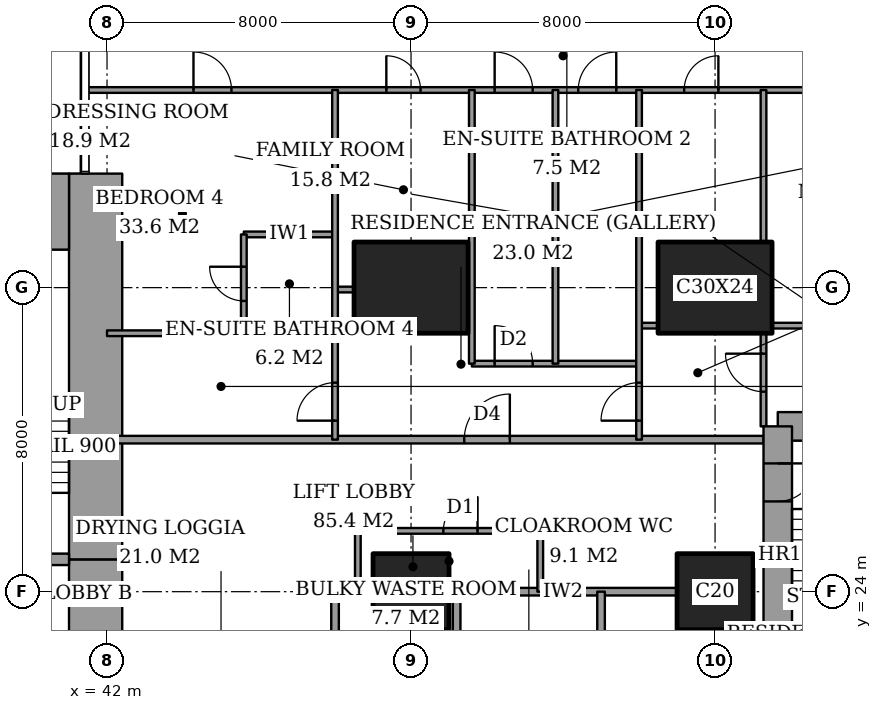
"""IFC4 building model, lengths in metres.
Left out: names, types, materials, properties, quantities, classifications, styles, units other than length and angle.
Written with IfcOpenShell. Run it as: python <this file> out.ifc"""

import sys

from ifc_helpers import new_model, si_unit, direction, frame, frame_2d, origin, origin_2d, place, context, subcontext, project, spatial, rectangle, extrude, element, fill, save


model = new_model("IFC4")
c1 = context("Model", 3, precision=1e-05, world=origin(), true_north=direction((0.0, 1.0)))
c2 = subcontext(c1, "Body", "Model", "MODEL_VIEW")
j1 = project(units=[si_unit("LENGTHUNIT", "METRE"), si_unit("PLANEANGLEUNIT", "RADIAN")], contexts=[c1])
p1 = place(None, origin())
s1 = spatial("IfcSite", under=j1, at=p1, CompositionType="ELEMENT")
p2 = place(p1, origin())
s2 = spatial("IfcBuilding", under=s1, at=p2, CompositionType="ELEMENT")
p3 = place(p2, frame((0.0, 0.0, 150.2)))
s3 = spatial("IfcBuildingStorey", under=s2, at=p3, CompositionType="ELEMENT", Elevation=150.2)
p4 = place(p3, frame((50.0, 24.0, 0.0), z_axis=(0.0, 0.0, 1.0), x_axis=(1.0, 0.0, 0.0)))
e1 = element("IfcColumn", 1, at=p4, inside=s3, PredefinedType="COLUMN", context=c2, shape_type="SweptSolid", body=[
    extrude(rectangle(XDim=2.0, YDim=2.0, at=origin_2d()), origin(), (0.0, 0.0, 1.0), 3.6),
])
p5 = place(p3, frame((50.0, 32.0, 0.0), z_axis=(0.0, 0.0, 1.0), x_axis=(1.0, 0.0, 0.0)))
e2 = element("IfcColumn", 2, at=p5, inside=s3, PredefinedType="COLUMN", context=c2, shape_type="SweptSolid", body=[
    extrude(rectangle(XDim=3.0, YDim=2.4, at=origin_2d()), origin(), (0.0, 0.0, 1.0), 3.6),
])
p6 = place(p3, frame((58.0, 24.0, 0.0), z_axis=(0.0, 0.0, 1.0), x_axis=(1.0, 0.0, 0.0)))
e3 = element("IfcColumn", 3, at=p6, inside=s3, PredefinedType="COLUMN", context=c2, shape_type="SweptSolid", body=[
    extrude(rectangle(XDim=2.0, YDim=2.0, at=origin_2d()), origin(), (0.0, 0.0, 1.0), 3.6),
])
p7 = place(p3, frame((58.0, 32.0, 0.0), z_axis=(0.0, 0.0, 1.0), x_axis=(1.0, 0.0, 0.0)))
e4 = element("IfcColumn", 4, at=p7, inside=s3, PredefinedType="COLUMN", context=c2, shape_type="SweptSolid", body=[
    extrude(rectangle(XDim=3.0, YDim=2.4, at=origin_2d()), origin(), (0.0, 0.0, 1.0), 3.6),
])
p8 = place(p3, frame((37.85, 34.0, 0.0), z_axis=(0.0, 0.0, 1.0), x_axis=(1.0, 0.0, 0.0)))
e5 = element("IfcWall", 5, at=p8, inside=s3, PredefinedType="SHEAR", context=c2, shape_type="SweptSolid", body=[
    extrude(rectangle(XDim=3.15, YDim=2.0, at=frame_2d((1.575, 0.0))), origin(), (0.0, 0.0, 1.0), 3.6),
])
p9 = place(p3, frame((41.7, 13.0, 0.0), z_axis=(0.0, 0.0, 1.0), x_axis=(0.0, 1.0, 0.0)))
e6 = element("IfcWall", 6, at=p9, inside=s3, PredefinedType="SHEAR", context=c2, shape_type="SweptSolid", body=[
    extrude(rectangle(XDim=11.85, YDim=1.4, at=frame_2d((5.925, 0.0))), origin(), (0.0, 0.0, 1.0), 3.6),
])
p10 = place(p9, frame((7.5, 0.0, 0.0)))
e7 = element("IfcOpeningElement", 7, at=p10, cuts=e6, PredefinedType="OPENING", context=c2, shape_type="SweptSolid", body=[
    extrude(rectangle(XDim=1.8, YDim=2.4, at=frame_2d((0.9, 1.2))), frame((0.0, 0.71, 0.0), z_axis=(0.0, -1.0, 0.0), x_axis=(1.0, 0.0, 0.0)), (0.0, 0.0, 1.0), 1.42),
])
p11 = place(p3, frame((41.7, 24.85, 0.0), z_axis=(0.0, 0.0, 1.0), x_axis=(0.0, 1.0, 0.0)))
e8 = element("IfcWall", 8, at=p11, inside=s3, PredefinedType="SHEAR", context=c2, shape_type="SweptSolid", body=[
    extrude(rectangle(XDim=10.15, YDim=1.4, at=frame_2d((5.075, 0.0))), origin(), (0.0, 0.0, 1.0), 3.6),
])
p12 = place(p3, frame((37.85, 24.85, 0.0), z_axis=(0.0, 0.0, 1.0), x_axis=(1.0, 0.0, 0.0)))
e9 = element("IfcWall", 9, at=p12, inside=s3, PredefinedType="SHEAR", context=c2, shape_type="SweptSolid", body=[
    extrude(rectangle(XDim=3.15, YDim=0.3, at=frame_2d((1.575, 0.0))), origin(), (0.0, 0.0, 1.0), 3.6),
])
p13 = place(p12, frame((0.95, 0.0, 0.0)))
e10 = element("IfcOpeningElement", 10, at=p13, cuts=e9, PredefinedType="OPENING", context=c2, shape_type="SweptSolid", body=[
    extrude(rectangle(XDim=1.0, YDim=2.1, at=frame_2d((0.5, 1.05))), frame((0.0, 0.16, 0.0), z_axis=(0.0, -1.0, 0.0), x_axis=(1.0, 0.0, 0.0)), (0.0, 0.0, 1.0), 0.32),
])
p14 = place(p3, frame((64.1, 28.35, 0.0), z_axis=(0.0, 0.0, 1.0), x_axis=(-1.0, 0.0, 0.0)))
e11 = element("IfcWall", 11, at=p14, inside=s3, PredefinedType="SHEAR", context=c2, shape_type="SweptSolid", body=[
    extrude(rectangle(XDim=4.45, YDim=0.75, at=frame_2d((2.225, 0.0))), origin(), (0.0, 0.0, 1.0), 3.6),
])
p15 = place(p3, frame((59.65, 28.35, 0.0), z_axis=(0.0, 0.0, 1.0), x_axis=(0.0, -1.0, 0.0)))
e12 = element("IfcWall", 12, at=p15, inside=s3, PredefinedType="SHEAR", context=c2, shape_type="SweptSolid", body=[
    extrude(rectangle(XDim=8.7, YDim=0.75, at=frame_2d((4.35, 0.0))), origin(), (0.0, 0.0, 1.0), 3.6),
])
p16 = place(p15, frame((0.975, 0.0, 0.0)))
e13 = element("IfcOpeningElement", 13, at=p16, cuts=e12, PredefinedType="OPENING", context=c2, shape_type="SweptSolid", body=[
    extrude(rectangle(XDim=1.0, YDim=2.1, at=frame_2d((0.5, 1.05))), frame((0.0, 0.385, 0.0), z_axis=(0.0, -1.0, 0.0), x_axis=(1.0, 0.0, 0.0)), (0.0, 0.0, 1.0), 0.77),
])
p17 = place(p3, frame((48.0, 24.0, 0.0), z_axis=(0.0, 0.0, 1.0), x_axis=(1.0, 0.0, 0.0)))
e14 = element("IfcWall", 14, at=p17, inside=s3, PredefinedType="PARTITIONING", context=c2, shape_type="SweptSolid", body=[
    extrude(rectangle(XDim=1.0, YDim=0.2, at=frame_2d((0.5, 0.0))), origin(), (0.0, 0.0, 1.0), 3.35),
])
p18 = place(p3, frame((51.0, 24.0, 0.0), z_axis=(0.0, 0.0, 1.0), x_axis=(1.0, 0.0, 0.0)))
e15 = element("IfcWall", 15, at=p18, inside=s3, PredefinedType="PARTITIONING", context=c2, shape_type="SweptSolid", body=[
    extrude(rectangle(XDim=6.0, YDim=0.2, at=frame_2d((3.0, 0.0))), origin(), (0.0, 0.0, 1.0), 3.35),
])
p19 = place(p3, frame((48.6, 25.6, 0.0), z_axis=(0.0, 0.0, 1.0), x_axis=(1.0, 0.0, 0.0)))
e16 = element("IfcWall", 16, at=p19, inside=s3, PredefinedType="PARTITIONING", context=c2, shape_type="SweptSolid", body=[
    extrude(rectangle(XDim=4.8, YDim=0.15, at=frame_2d((2.4, 0.0))), origin(), (0.0, 0.0, 1.0), 3.35),
])
p20 = place(p19, frame((2.25, 0.0, 0.0)))
e17 = element("IfcOpeningElement", 17, at=p20, cuts=e16, PredefinedType="OPENING", context=c2, shape_type="SweptSolid", body=[
    extrude(rectangle(XDim=0.9, YDim=2.1, at=frame_2d((0.45, 1.05))), frame((0.0, 0.085, 0.0), z_axis=(0.0, -1.0, 0.0), x_axis=(1.0, 0.0, 0.0)), (0.0, 0.0, 1.0), 0.17),
])
p21 = place(p3, frame((42.0, 28.0, 0.0), z_axis=(0.0, 0.0, 1.0), x_axis=(1.0, 0.0, 0.0)))
e18 = element("IfcWall", 18, at=p21, inside=s3, PredefinedType="PARTITIONING", context=c2, shape_type="SweptSolid", body=[
    extrude(rectangle(XDim=17.275, YDim=0.2, at=frame_2d((8.637, 0.0))), origin(), (0.0, 0.0, 1.0), 3.35),
])
p22 = place(p21, frame((9.4, 0.0, 0.0)))
e19 = element("IfcOpeningElement", 19, at=p22, cuts=e18, PredefinedType="OPENING", context=c2, shape_type="SweptSolid", body=[
    extrude(rectangle(XDim=1.2, YDim=2.4, at=frame_2d((0.6, 1.2))), frame((0.0, 0.11, 0.0), z_axis=(0.0, -1.0, 0.0), x_axis=(1.0, 0.0, 0.0)), (0.0, 0.0, 1.0), 0.22),
])
p23 = place(p3, frame((51.6, 30.0, 0.0), z_axis=(0.0, 0.0, 1.0), x_axis=(1.0, 0.0, 0.0)))
e20 = element("IfcWall", 20, at=p23, inside=s3, PredefinedType="PARTITIONING", context=c2, shape_type="SweptSolid", body=[
    extrude(rectangle(XDim=4.4, YDim=0.15, at=frame_2d((2.2, 0.0))), origin(), (0.0, 0.0, 1.0), 3.35),
])
p24 = place(p23, frame((0.6, 0.0, 0.0)))
e21 = element("IfcOpeningElement", 21, at=p24, cuts=e20, PredefinedType="OPENING", context=c2, shape_type="SweptSolid", body=[
    extrude(rectangle(XDim=1.0, YDim=2.1, at=frame_2d((0.5, 1.05))), frame((0.0, 0.085, 0.0), z_axis=(0.0, -1.0, 0.0), x_axis=(1.0, 0.0, 0.0)), (0.0, 0.0, 1.0), 0.17),
])
p25 = place(p3, frame((42.0, 30.8, 0.0), z_axis=(0.0, 0.0, 1.0), x_axis=(1.0, 0.0, 0.0)))
e22 = element("IfcWall", 22, at=p25, inside=s3, PredefinedType="PARTITIONING", context=c2, shape_type="SweptSolid", body=[
    extrude(rectangle(XDim=6.0, YDim=0.15, at=frame_2d((3.0, 0.0))), origin(), (0.0, 0.0, 1.0), 3.35),
])
p26 = place(p3, frame((56.0, 31.0, 0.0), z_axis=(0.0, 0.0, 1.0), x_axis=(1.0, 0.0, 0.0)))
e23 = element("IfcWall", 23, at=p26, inside=s3, PredefinedType="PARTITIONING", context=c2, shape_type="SweptSolid", body=[
    extrude(rectangle(XDim=0.5, YDim=0.15, at=frame_2d((0.25, 0.0))), origin(), (0.0, 0.0, 1.0), 3.35),
])
p27 = place(p3, frame((59.5, 31.0, 0.0), z_axis=(0.0, 0.0, 1.0), x_axis=(1.0, 0.0, 0.0)))
e24 = element("IfcWall", 24, at=p27, inside=s3, PredefinedType="PARTITIONING", context=c2, shape_type="SweptSolid", body=[
    extrude(rectangle(XDim=5.15, YDim=0.15, at=frame_2d((2.575, 0.0))), origin(), (0.0, 0.0, 1.0), 3.35),
])
p28 = place(p3, frame((48.0, 31.95, 0.0), z_axis=(0.0, 0.0, 1.0), x_axis=(1.0, 0.0, 0.0)))
e25 = element("IfcWall", 25, at=p28, inside=s3, PredefinedType="PARTITIONING", context=c2, shape_type="SweptSolid", body=[
    extrude(rectangle(XDim=0.5, YDim=0.15, at=frame_2d((0.25, 0.0))), origin(), (0.0, 0.0, 1.0), 2.634),
])
p29 = place(p3, frame((45.6, 33.4, 0.0), z_axis=(0.0, 0.0, 1.0), x_axis=(1.0, 0.0, 0.0)))
e26 = element("IfcWall", 26, at=p29, inside=s3, PredefinedType="PARTITIONING", context=c2, shape_type="SweptSolid", body=[
    extrude(rectangle(XDim=2.4, YDim=0.15, at=frame_2d((1.2, 0.0))), origin(), (0.0, 0.0, 1.0), 3.35),
])
p30 = place(p3, frame((41.439, 37.2, 0.0), z_axis=(0.0, 0.0, 1.0), x_axis=(1.0, 0.0, 0.0)))
e27 = element("IfcWall", 27, at=p30, inside=s3, PredefinedType="PARTITIONING", context=c2, shape_type="SweptSolid", body=[
    extrude(rectangle(XDim=25.011, YDim=0.15, at=frame_2d((12.505, 0.0))), origin(), (0.0, 0.0, 1.0), 3.35),
])
p31 = place(p30, frame((10.761, 0.0, 0.0)))
e28 = element("IfcOpeningElement", 28, at=p31, cuts=e27, PredefinedType="OPENING", context=c2, shape_type="SweptSolid", body=[
    extrude(rectangle(XDim=1.0, YDim=2.1, at=frame_2d((0.5, 1.05))), frame((0.0, 0.085, 0.0), z_axis=(0.0, -1.0, 0.0), x_axis=(1.0, 0.0, 0.0)), (0.0, 0.0, 1.0), 0.17),
])
p32 = place(p30, frame((20.924, 0.0, 0.0)))
e29 = element("IfcOpeningElement", 29, at=p32, cuts=e27, PredefinedType="OPENING", context=c2, shape_type="SweptSolid", body=[
    extrude(rectangle(XDim=1.0, YDim=2.1, at=frame_2d((0.5, 1.05))), frame((0.0, 0.085, 0.0), z_axis=(0.0, -1.0, 0.0), x_axis=(1.0, 0.0, 0.0)), (0.0, 0.0, 1.0), 0.17),
])
p33 = place(p30, frame((15.749, 0.0, 0.0)))
e30 = element("IfcOpeningElement", 30, at=p33, cuts=e27, PredefinedType="OPENING", context=c2, shape_type="SweptSolid", body=[
    extrude(rectangle(XDim=0.9, YDim=2.1, at=frame_2d((0.45, 1.05))), frame((0.0, 0.085, 0.0), z_axis=(0.0, -1.0, 0.0), x_axis=(1.0, 0.0, 0.0)), (0.0, 0.0, 1.0), 0.17),
])
p34 = place(p30, frame((12.961, 0.0, 0.0)))
e31 = element("IfcOpeningElement", 31, at=p34, cuts=e27, PredefinedType="OPENING", context=c2, shape_type="SweptSolid", body=[
    extrude(rectangle(XDim=1.0, YDim=2.1, at=frame_2d((0.5, 1.05))), frame((0.0, 0.085, 0.0), z_axis=(0.0, -1.0, 0.0), x_axis=(1.0, 0.0, 0.0)), (0.0, 0.0, 1.0), 0.17),
])
p35 = place(p30, frame((7.911, 0.0, 0.0)))
e32 = element("IfcOpeningElement", 32, at=p35, cuts=e27, PredefinedType="OPENING", context=c2, shape_type="SweptSolid", body=[
    extrude(rectangle(XDim=0.9, YDim=2.1, at=frame_2d((0.45, 1.05))), frame((0.0, 0.085, 0.0), z_axis=(0.0, -1.0, 0.0), x_axis=(1.0, 0.0, 0.0)), (0.0, 0.0, 1.0), 0.17),
])
p36 = place(p30, frame((2.836, 0.0, 0.0)))
e33 = element("IfcOpeningElement", 33, at=p36, cuts=e27, PredefinedType="OPENING", context=c2, shape_type="SweptSolid", body=[
    extrude(rectangle(XDim=1.0, YDim=2.1, at=frame_2d((0.5, 1.05))), frame((0.0, 0.085, 0.0), z_axis=(0.0, -1.0, 0.0), x_axis=(1.0, 0.0, 0.0)), (0.0, 0.0, 1.0), 0.17),
])
p37 = place(p3, frame((45.6, 30.8, 0.0), z_axis=(0.0, 0.0, 1.0), x_axis=(0.0, 1.0, 0.0)))
e34 = element("IfcWall", 34, at=p37, inside=s3, PredefinedType="PARTITIONING", context=c2, shape_type="SweptSolid", body=[
    extrude(rectangle(XDim=2.6, YDim=0.15, at=frame_2d((1.3, 0.0))), origin(), (0.0, 0.0, 1.0), 3.35),
])
p38 = place(p37, frame((0.85, 0.0, 0.0)))
e35 = element("IfcOpeningElement", 35, at=p38, cuts=e34, PredefinedType="OPENING", context=c2, shape_type="SweptSolid", body=[
    extrude(rectangle(XDim=0.9, YDim=2.1, at=frame_2d((0.45, 1.05))), frame((0.0, 0.085, 0.0), z_axis=(0.0, -1.0, 0.0), x_axis=(1.0, 0.0, 0.0)), (0.0, 0.0, 1.0), 0.17),
])
p39 = place(p3, frame((48.0, 19.0, 0.0), z_axis=(0.0, 0.0, 1.0), x_axis=(0.0, 1.0, 0.0)))
e36 = element("IfcWall", 36, at=p39, inside=s3, PredefinedType="PARTITIONING", context=c2, shape_type="SweptSolid", body=[
    extrude(rectangle(XDim=5.0, YDim=0.2, at=frame_2d((2.5, 0.0))), origin(), (0.0, 0.0, 1.0), 3.35),
])
p40 = place(p39, frame((2.4, 0.0, 0.0)))
e37 = element("IfcOpeningElement", 37, at=p40, cuts=e36, PredefinedType="OPENING", context=c2, shape_type="SweptSolid", body=[
    extrude(rectangle(XDim=1.2, YDim=2.4, at=frame_2d((0.6, 1.2))), frame((0.0, 0.11, 0.0), z_axis=(0.0, -1.0, 0.0), x_axis=(1.0, 0.0, 0.0)), (0.0, 0.0, 1.0), 0.22),
])
p41 = place(p3, frame((48.0, 28.0, 0.0), z_axis=(0.0, 0.0, 1.0), x_axis=(0.0, 1.0, 0.0)))
e38 = element("IfcWall", 38, at=p41, inside=s3, PredefinedType="PARTITIONING", context=c2, shape_type="SweptSolid", body=[
    extrude(rectangle(XDim=9.2, YDim=0.15, at=frame_2d((4.6, 0.0))), origin(), (0.0, 0.0, 1.0), 3.35),
])
p42 = place(p41, frame((0.5, 0.0, 0.0)))
e39 = element("IfcOpeningElement", 39, at=p42, cuts=e38, PredefinedType="OPENING", context=c2, shape_type="SweptSolid", body=[
    extrude(rectangle(XDim=1.0, YDim=2.1, at=frame_2d((0.5, 1.05))), frame((0.0, 0.085, 0.0), z_axis=(0.0, -1.0, 0.0), x_axis=(1.0, 0.0, 0.0)), (0.0, 0.0, 1.0), 0.17),
])
p43 = place(p3, frame((48.6, 24.0, 0.0), z_axis=(0.0, 0.0, 1.0), x_axis=(0.0, 1.0, 0.0)))
e40 = element("IfcWall", 40, at=p43, inside=s3, PredefinedType="PARTITIONING", context=c2, shape_type="SweptSolid", body=[
    extrude(rectangle(XDim=1.6, YDim=0.15, at=frame_2d((0.8, 0.0))), origin(), (0.0, 0.0, 1.0), 3.35),
])
p44 = place(p3, frame((51.2, 21.6, 0.0), z_axis=(0.0, 0.0, 1.0), x_axis=(0.0, 1.0, 0.0)))
e41 = element("IfcWall", 41, at=p44, inside=s3, PredefinedType="PARTITIONING", context=c2, shape_type="SweptSolid", body=[
    extrude(rectangle(XDim=2.4, YDim=0.2, at=frame_2d((1.2, 0.0))), origin(), (0.0, 0.0, 1.0), 3.35),
])
p45 = place(p3, frame((51.6, 30.0, 0.0), z_axis=(0.0, 0.0, 1.0), x_axis=(0.0, 1.0, 0.0)))
e42 = element("IfcWall", 42, at=p45, inside=s3, PredefinedType="PARTITIONING", context=c2, shape_type="SweptSolid", body=[
    extrude(rectangle(XDim=7.2, YDim=0.15, at=frame_2d((3.6, 0.0))), origin(), (0.0, 0.0, 1.0), 3.35),
])
p46 = place(p3, frame((53.4, 24.0, 0.0), z_axis=(0.0, 0.0, 1.0), x_axis=(0.0, 1.0, 0.0)))
e43 = element("IfcWall", 43, at=p46, inside=s3, PredefinedType="PARTITIONING", context=c2, shape_type="SweptSolid", body=[
    extrude(rectangle(XDim=1.6, YDim=0.15, at=frame_2d((0.8, 0.0))), origin(), (0.0, 0.0, 1.0), 3.35),
])
p47 = place(p3, frame((53.8, 30.0, 0.0), z_axis=(0.0, 0.0, 1.0), x_axis=(0.0, 1.0, 0.0)))
e44 = element("IfcWall", 44, at=p47, inside=s3, PredefinedType="PARTITIONING", context=c2, shape_type="SweptSolid", body=[
    extrude(rectangle(XDim=7.2, YDim=0.15, at=frame_2d((3.6, 0.0))), origin(), (0.0, 0.0, 1.0), 3.35),
])
p48 = place(p3, frame((55.0, 21.6, 0.0), z_axis=(0.0, 0.0, 1.0), x_axis=(0.0, 1.0, 0.0)))
e45 = element("IfcWall", 45, at=p48, inside=s3, PredefinedType="PARTITIONING", context=c2, shape_type="SweptSolid", body=[
    extrude(rectangle(XDim=2.4, YDim=0.2, at=frame_2d((1.2, 0.0))), origin(), (0.0, 0.0, 1.0), 3.35),
])
p49 = place(p3, frame((56.0, 28.0, 0.0), z_axis=(0.0, 0.0, 1.0), x_axis=(0.0, 1.0, 0.0)))
e46 = element("IfcWall", 46, at=p49, inside=s3, PredefinedType="PARTITIONING", context=c2, shape_type="SweptSolid", body=[
    extrude(rectangle(XDim=9.2, YDim=0.15, at=frame_2d((4.6, 0.0))), origin(), (0.0, 0.0, 1.0), 3.35),
])
p50 = place(p49, frame((0.5, 0.0, 0.0)))
e47 = element("IfcOpeningElement", 47, at=p50, cuts=e46, PredefinedType="OPENING", context=c2, shape_type="SweptSolid", body=[
    extrude(rectangle(XDim=1.0, YDim=2.1, at=frame_2d((0.5, 1.05))), frame((0.0, 0.085, 0.0), z_axis=(0.0, -1.0, 0.0), x_axis=(1.0, 0.0, 0.0)), (0.0, 0.0, 1.0), 0.17),
])
p51 = place(p3, frame((59.275, 28.35, 0.0), z_axis=(0.0, 0.0, 1.0), x_axis=(0.0, 1.0, 0.0)))
e48 = element("IfcWall", 48, at=p51, inside=s3, PredefinedType="PARTITIONING", context=c2, shape_type="SweptSolid", body=[
    extrude(rectangle(XDim=2.45, YDim=0.15, at=frame_2d((1.225, 0.0))), origin(), (0.0, 0.0, 1.0), 3.35),
])
p52 = place(p51, frame((0.913, 0.0, 0.0)))
e49 = element("IfcOpeningElement", 49, at=p52, cuts=e48, PredefinedType="OPENING", context=c2, shape_type="SweptSolid", body=[
    extrude(rectangle(XDim=1.0, YDim=2.1, at=frame_2d((0.5, 1.05))), frame((0.0, 0.085, 0.0), z_axis=(0.0, -1.0, 0.0), x_axis=(1.0, 0.0, 0.0)), (0.0, 0.0, 1.0), 0.17),
])
p53 = place(p3, frame((59.275, 33.2, 0.0), z_axis=(0.0, 0.0, 1.0), x_axis=(0.0, 1.0, 0.0)))
e50 = element("IfcWall", 50, at=p53, inside=s3, PredefinedType="PARTITIONING", context=c2, shape_type="SweptSolid", body=[
    extrude(rectangle(XDim=4.0, YDim=0.15, at=frame_2d((2.0, 0.0))), origin(), (0.0, 0.0, 1.0), 3.35),
])
p54 = place(p31, origin())
e51 = element("IfcDoor", 51, at=p54, inside=s3, OperationType="SINGLE_SWING_RIGHT", PredefinedType="DOOR", context=c2, shape_type="SweptSolid", body=[
    extrude(rectangle(XDim=1.0, YDim=2.1, at=frame_2d((0.5, 1.05))), frame((0.0, 0.025, 0.0), z_axis=(0.0, -1.0, 0.0), x_axis=(1.0, 0.0, 0.0)), (0.0, 0.0, 1.0), 0.05),
])
fill(e28, e51)
p55 = place(p52, origin())
e52 = element("IfcDoor", 52, at=p55, inside=s3, OperationType="SINGLE_SWING_LEFT", PredefinedType="DOOR", context=c2, shape_type="SweptSolid", body=[
    extrude(rectangle(XDim=1.0, YDim=2.1, at=frame_2d((0.5, 1.05))), frame((0.0, 0.025, 0.0), z_axis=(0.0, -1.0, 0.0), x_axis=(1.0, 0.0, 0.0)), (0.0, 0.0, 1.0), 0.05),
])
fill(e49, e52)
p56 = place(p33, origin())
e53 = element("IfcDoor", 53, at=p56, inside=s3, OperationType="SINGLE_SWING_LEFT", PredefinedType="DOOR", context=c2, shape_type="SweptSolid", body=[
    extrude(rectangle(XDim=0.9, YDim=2.1, at=frame_2d((0.45, 1.05))), frame((0.0, 0.025, 0.0), z_axis=(0.0, -1.0, 0.0), x_axis=(1.0, 0.0, 0.0)), (0.0, 0.0, 1.0), 0.05),
])
fill(e30, e53)
p57 = place(p50, origin())
e54 = element("IfcDoor", 54, at=p57, inside=s3, OperationType="SINGLE_SWING_RIGHT", PredefinedType="DOOR", context=c2, shape_type="SweptSolid", body=[
    extrude(rectangle(XDim=1.0, YDim=2.1, at=frame_2d((0.5, 1.05))), frame((0.0, 0.025, 0.0), z_axis=(0.0, -1.0, 0.0), x_axis=(1.0, 0.0, 0.0)), (0.0, 0.0, 1.0), 0.05),
])
fill(e47, e54)
p58 = place(p22, origin())
e55 = element("IfcDoor", 55, at=p58, inside=s3, OperationType="SINGLE_SWING_LEFT", PredefinedType="DOOR", context=c2, shape_type="SweptSolid", body=[
    extrude(rectangle(XDim=1.2, YDim=2.4, at=frame_2d((0.6, 1.2))), frame((0.0, 0.025, 0.0), z_axis=(0.0, -1.0, 0.0), x_axis=(1.0, 0.0, 0.0)), (0.0, 0.0, 1.0), 0.05),
])
fill(e19, e55)
p59 = place(p34, origin())
e56 = element("IfcDoor", 56, at=p59, inside=s3, OperationType="SINGLE_SWING_LEFT", PredefinedType="DOOR", context=c2, shape_type="SweptSolid", body=[
    extrude(rectangle(XDim=1.0, YDim=2.1, at=frame_2d((0.5, 1.05))), frame((0.0, 0.025, 0.0), z_axis=(0.0, -1.0, 0.0), x_axis=(1.0, 0.0, 0.0)), (0.0, 0.0, 1.0), 0.05),
])
fill(e31, e56)
p60 = place(p24, origin())
e57 = element("IfcDoor", 57, at=p60, inside=s3, OperationType="SINGLE_SWING_RIGHT", PredefinedType="DOOR", context=c2, shape_type="SweptSolid", body=[
    extrude(rectangle(XDim=1.0, YDim=2.1, at=frame_2d((0.5, 1.05))), frame((0.0, 0.025, 0.0), z_axis=(0.0, -1.0, 0.0), x_axis=(1.0, 0.0, 0.0)), (0.0, 0.0, 1.0), 0.05),
])
fill(e21, e57)
p61 = place(p35, origin())
e58 = element("IfcDoor", 58, at=p61, inside=s3, OperationType="SINGLE_SWING_RIGHT", PredefinedType="DOOR", context=c2, shape_type="SweptSolid", body=[
    extrude(rectangle(XDim=0.9, YDim=2.1, at=frame_2d((0.45, 1.05))), frame((0.0, 0.025, 0.0), z_axis=(0.0, -1.0, 0.0), x_axis=(1.0, 0.0, 0.0)), (0.0, 0.0, 1.0), 0.05),
])
fill(e32, e58)
p62 = place(p38, origin())
e59 = element("IfcDoor", 59, at=p62, inside=s3, OperationType="SINGLE_SWING_LEFT", PredefinedType="DOOR", context=c2, shape_type="SweptSolid", body=[
    extrude(rectangle(XDim=0.9, YDim=2.1, at=frame_2d((0.45, 1.05))), frame((0.0, 0.025, 0.0), z_axis=(0.0, -1.0, 0.0), x_axis=(1.0, 0.0, 0.0)), (0.0, 0.0, 1.0), 0.05),
])
fill(e35, e59)
p63 = place(p36, origin())
e60 = element("IfcDoor", 60, at=p63, inside=s3, OperationType="SINGLE_SWING_RIGHT", PredefinedType="DOOR", context=c2, shape_type="SweptSolid", body=[
    extrude(rectangle(XDim=1.0, YDim=2.1, at=frame_2d((0.5, 1.05))), frame((0.0, 0.025, 0.0), z_axis=(0.0, -1.0, 0.0), x_axis=(1.0, 0.0, 0.0)), (0.0, 0.0, 1.0), 0.05),
])
fill(e33, e60)
p64 = place(p42, origin())
e61 = element("IfcDoor", 61, at=p64, inside=s3, OperationType="SINGLE_SWING_RIGHT", PredefinedType="DOOR", context=c2, shape_type="SweptSolid", body=[
    extrude(rectangle(XDim=1.0, YDim=2.1, at=frame_2d((0.5, 1.05))), frame((0.0, 0.025, 0.0), z_axis=(0.0, -1.0, 0.0), x_axis=(1.0, 0.0, 0.0)), (0.0, 0.0, 1.0), 0.05),
])
fill(e39, e61)
p65 = place(p20, origin())
e62 = element("IfcDoor", 62, at=p65, inside=s3, OperationType="SINGLE_SWING_LEFT", PredefinedType="DOOR", context=c2, shape_type="SweptSolid", body=[
    extrude(rectangle(XDim=0.9, YDim=2.1, at=frame_2d((0.45, 1.05))), frame((0.0, 0.025, 0.0), z_axis=(0.0, -1.0, 0.0), x_axis=(1.0, 0.0, 0.0)), (0.0, 0.0, 1.0), 0.05),
])
fill(e17, e62)
p66 = place(p16, origin())
e63 = element("IfcDoor", 63, at=p66, inside=s3, OperationType="SINGLE_SWING_RIGHT", PredefinedType="DOOR", context=c2, shape_type="SweptSolid", body=[
    extrude(rectangle(XDim=1.0, YDim=2.1, at=frame_2d((0.5, 1.05))), frame((0.0, 0.025, 0.0), z_axis=(0.0, -1.0, 0.0), x_axis=(1.0, 0.0, 0.0)), (0.0, 0.0, 1.0), 0.05),
])
fill(e13, e63)
save(model, sys.argv[1])
